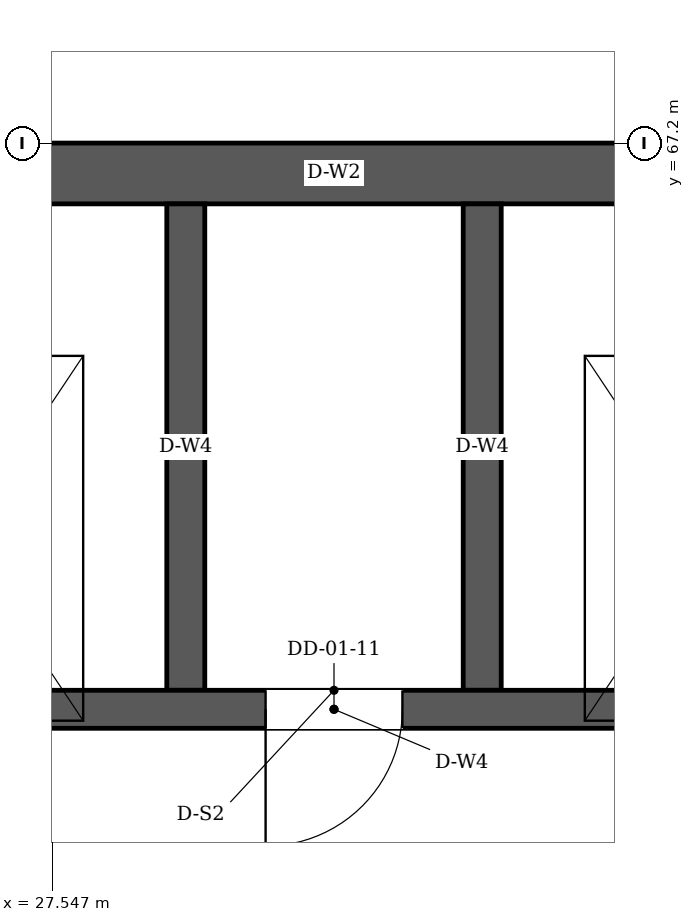
"""IFC4 building model, lengths in metres.
Left out: names, types, materials, properties, quantities, classifications, styles, units other than length and angle.
Written with IfcOpenShell. Run it as: python <this file> out.ifc"""

import sys

from ifc_helpers import new_model, si_unit, direction, frame, frame_2d, origin, place, context, subcontext, project, spatial, rectangle, extrude, element, fill, save


model = new_model("IFC4")
c1 = context("Model", 3, precision=1e-05, world=origin(), true_north=direction((0.0, 1.0)))
c2 = subcontext(c1, "Body", "Model", "MODEL_VIEW")
j1 = project(units=[si_unit("LENGTHUNIT", "METRE"), si_unit("PLANEANGLEUNIT", "RADIAN")], contexts=[c1])
p1 = place(None, origin())
s1 = spatial("IfcSite", under=j1, at=p1, CompositionType="ELEMENT")
p2 = place(p1, origin())
s2 = spatial("IfcBuilding", under=s1, at=p2, CompositionType="ELEMENT")
p3 = place(p2, frame((0.0, 0.0, 6.0)))
s3 = spatial("IfcBuildingStorey", under=s2, at=p3, CompositionType="ELEMENT", Elevation=6.0)
p4 = place(p3, frame((25.2, 67.0, 0.0), z_axis=(0.0, 0.0, 1.0), x_axis=(1.0, 0.0, 0.0)))
e1 = element("IfcWall", 1, at=p4, inside=s3, PredefinedType="SOLIDWALL", context=c2, shape_type="SweptSolid", body=[
    extrude(rectangle(XDim=8.4, YDim=0.4, at=frame_2d((4.2, 0.0))), origin(), (0.0, 0.0, 1.0), 3.92),
])
p5 = place(p3, frame((25.6, 63.475, 0.0), z_axis=(0.0, 0.0, 1.0), x_axis=(1.0, 0.0, 0.0)))
e2 = element("IfcWall", 2, at=p5, inside=s3, PredefinedType="SOLIDWALL", context=c2, shape_type="SweptSolid", body=[
    extrude(rectangle(XDim=7.6, YDim=0.25, at=frame_2d((3.8, 0.0))), origin(), (0.0, 0.0, 1.0), 3.92),
])
p6 = place(p5, frame((0.8, 0.0, 0.0)))
e3 = element("IfcOpeningElement", 3, at=p6, cuts=e2, PredefinedType="OPENING", context=c2, shape_type="SweptSolid", body=[
    extrude(rectangle(XDim=1.1, YDim=2.1, at=frame_2d((0.55, 1.05))), frame((0.0, 0.135, 0.0), z_axis=(0.0, -1.0, 0.0), x_axis=(1.0, 0.0, 0.0)), (0.0, 0.0, 1.0), 0.27),
])
p7 = place(p5, frame((5.7, 0.0, 0.0)))
e4 = element("IfcOpeningElement", 4, at=p7, cuts=e2, PredefinedType="OPENING", context=c2, shape_type="SweptSolid", body=[
    extrude(rectangle(XDim=1.1, YDim=2.1, at=frame_2d((0.55, 1.05))), frame((0.0, 0.135, 0.0), z_axis=(0.0, -1.0, 0.0), x_axis=(1.0, 0.0, 0.0)), (0.0, 0.0, 1.0), 0.27),
])
p8 = place(p5, frame((3.35, 0.0, 0.0)))
e5 = element("IfcOpeningElement", 5, at=p8, cuts=e2, PredefinedType="OPENING", context=c2, shape_type="SweptSolid", body=[
    extrude(rectangle(XDim=0.9, YDim=2.1, at=frame_2d((0.45, 1.05))), frame((0.0, 0.135, 0.0), z_axis=(0.0, -1.0, 0.0), x_axis=(1.0, 0.0, 0.0)), (0.0, 0.0, 1.0), 0.27),
])
for number, where, z_axis, x_axis in (
    (6, (28.425, 63.6, 0.0), (0.0, 0.0, 1.0), (0.0, 1.0, 0.0)),
    (7, (30.375, 63.6, 0.0), (0.0, 0.0, 1.0), (0.0, 1.0, 0.0)),
):
    element("IfcWall", number, at=place(p3, frame(where, z_axis=z_axis, x_axis=x_axis)), inside=s3, PredefinedType="SOLIDWALL", context=c2, shape_type="SweptSolid", body=[
        extrude(rectangle(XDim=3.2, YDim=0.25, at=frame_2d((1.6, 0.0))), origin(), (0.0, 0.0, 1.0), 3.92),
    ])
p9 = place(p8, origin())
e8 = element("IfcDoor", 8, at=p9, inside=s3, OperationType="SINGLE_SWING_LEFT", PredefinedType="DOOR", context=c2, shape_type="SweptSolid", body=[
    extrude(rectangle(XDim=0.9, YDim=2.1, at=frame_2d((0.45, 1.05))), frame((0.0, 0.025, 0.0), z_axis=(0.0, -1.0, 0.0), x_axis=(1.0, 0.0, 0.0)), (0.0, 0.0, 1.0), 0.05),
])
fill(e5, e8)
save(model, sys.argv[1])
